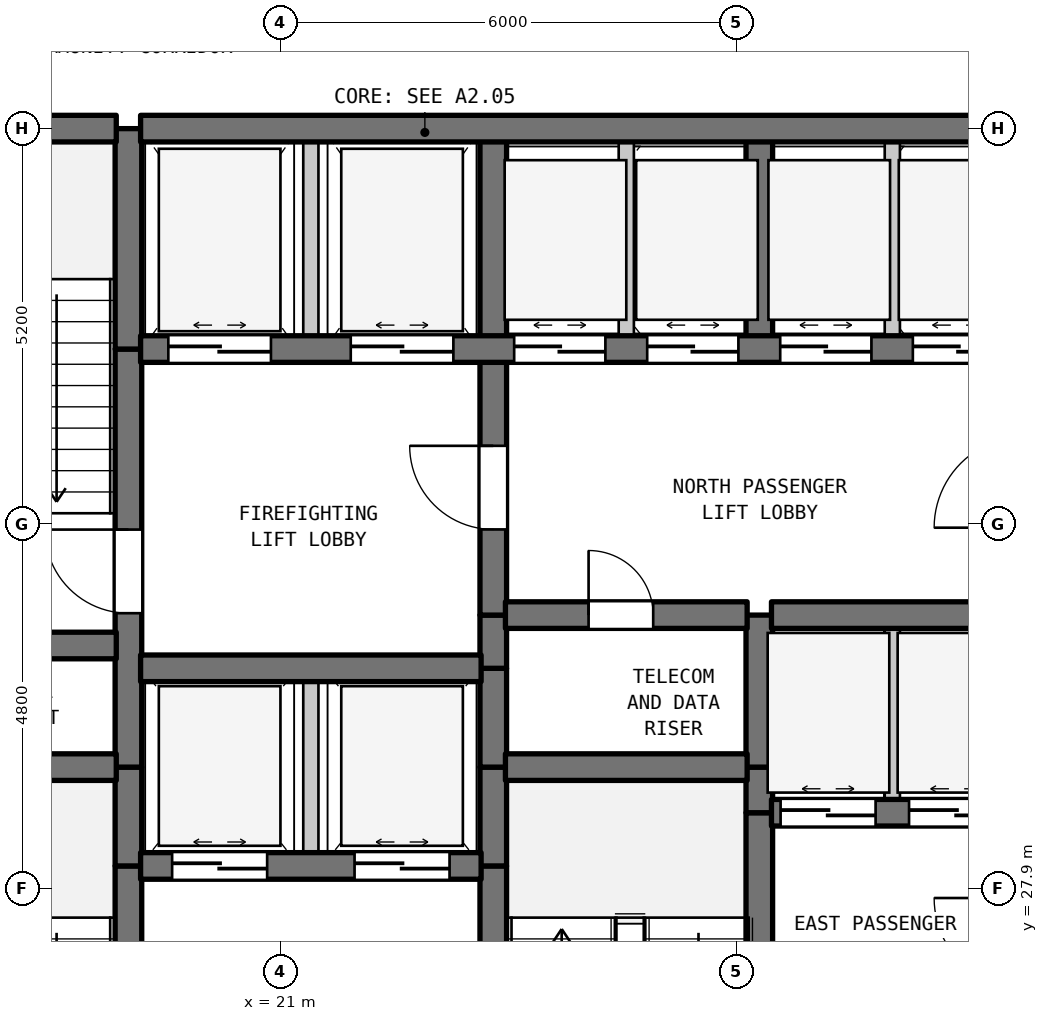
"""IFC4 building model, lengths in metres.
Left out: names, types, materials, properties, quantities, classifications, styles, units other than length and angle.
Written with IfcOpenShell. Run it as: python <this file> out.ifc"""

import sys

from ifc_helpers import new_model, si_unit, direction, frame, frame_2d, origin, place, context, subcontext, project, spatial, rectangle, extrude, element, fill, save


model = new_model("IFC4")
c1 = context("Model", 3, precision=1e-05, world=origin(), true_north=direction((0.0, 1.0)))
c2 = subcontext(c1, "Body", "Model", "MODEL_VIEW")
j1 = project(units=[si_unit("LENGTHUNIT", "METRE"), si_unit("PLANEANGLEUNIT", "RADIAN")], contexts=[c1])
p1 = place(None, origin())
s1 = spatial("IfcSite", under=j1, at=p1, CompositionType="ELEMENT")
p2 = place(p1, origin())
s2 = spatial("IfcBuilding", under=s1, at=p2, CompositionType="ELEMENT")
p3 = place(p2, frame((0.0, 0.0, 65.6)))
s3 = spatial("IfcBuildingStorey", under=s2, at=p3, CompositionType="ELEMENT", Elevation=65.6)
p4 = place(p3, frame((19.0, 22.7, 0.0), z_axis=(0.0, 0.0, 1.0), x_axis=(0.0, 1.0, 0.0)))
e1 = element("IfcWall", 1, at=p4, inside=s3, PredefinedType="SHEAR", context=c2, shape_type="SweptSolid", body=[
    extrude(rectangle(XDim=5.5, YDim=0.35, at=frame_2d((2.75, 0.0))), origin(), (0.0, 0.0, 1.0), 4.185),
])
p5 = place(p4, frame((0.631, 0.0, 0.0)))
e2 = element("IfcOpeningElement", 2, at=p5, cuts=e1, PredefinedType="OPENING", context=c2, shape_type="SweptSolid", body=[
    extrude(rectangle(XDim=1.1, YDim=2.15, at=frame_2d((0.55, 1.075))), frame((0.0, 0.185, 0.0), z_axis=(0.0, -1.0, 0.0), x_axis=(1.0, 0.0, 0.0)), (0.0, 0.0, 1.0), 0.37),
])
p6 = place(p3, frame((19.0, 28.2, 0.0), z_axis=(0.0, 0.0, 1.0), x_axis=(0.0, 1.0, 0.0)))
e3 = element("IfcWall", 3, at=p6, inside=s3, PredefinedType="SHEAR", context=c2, shape_type="SweptSolid", body=[
    extrude(rectangle(XDim=1.3, YDim=0.35, at=frame_2d((0.65, 0.0))), origin(), (0.0, 0.0, 1.0), 4.185),
])
p7 = place(p3, frame((19.0, 29.5, 0.0), z_axis=(0.0, 0.0, 1.0), x_axis=(0.0, 1.0, 0.0)))
e4 = element("IfcWall", 4, at=p7, inside=s3, PredefinedType="SHEAR", context=c2, shape_type="SweptSolid", body=[
    extrude(rectangle(XDim=5.5, YDim=0.35, at=frame_2d((2.75, 0.0))), origin(), (0.0, 0.0, 1.0), 4.185),
])
p8 = place(p7, frame((2.025, 0.0, 0.0)))
e5 = element("IfcOpeningElement", 5, at=p8, cuts=e4, PredefinedType="OPENING", context=c2, shape_type="SweptSolid", body=[
    extrude(rectangle(XDim=1.1, YDim=2.15, at=frame_2d((0.55, 1.075))), frame((0.0, 0.185, 0.0), z_axis=(0.0, -1.0, 0.0), x_axis=(1.0, 0.0, 0.0)), (0.0, 0.0, 1.0), 0.37),
])
p9 = place(p3, frame((19.0, 35.0, 0.0), z_axis=(0.0, 0.0, 1.0), x_axis=(0.0, 1.0, 0.0)))
e6 = element("IfcWall", 6, at=p9, inside=s3, PredefinedType="SHEAR", context=c2, shape_type="SweptSolid", body=[
    extrude(rectangle(XDim=2.9, YDim=0.35, at=frame_2d((1.45, 0.0))), origin(), (0.0, 0.0, 1.0), 4.185),
])
p10 = place(p3, frame((21.4, 28.2, 0.0), z_axis=(0.0, 0.0, 1.0), x_axis=(0.0, 1.0, 0.0)))
e7 = element("IfcWall", 7, at=p10, inside=s3, PredefinedType="STANDARD", context=c2, shape_type="SweptSolid", body=[
    extrude(rectangle(XDim=2.6, YDim=0.2, at=frame_2d((1.3, 0.0))), origin(), (0.0, 0.0, 1.0), 4.185),
])
p11 = place(p3, frame((21.4, 35.0, 0.0), z_axis=(0.0, 0.0, 1.0), x_axis=(0.0, 1.0, 0.0)))
e8 = element("IfcWall", 8, at=p11, inside=s3, PredefinedType="STANDARD", context=c2, shape_type="SweptSolid", body=[
    extrude(rectangle(XDim=2.9, YDim=0.2, at=frame_2d((1.45, 0.0))), origin(), (0.0, 0.0, 1.0), 4.185),
])
p12 = place(p3, frame((23.8, 22.7, 0.0), z_axis=(0.0, 0.0, 1.0), x_axis=(0.0, 1.0, 0.0)))
e9 = element("IfcWall", 9, at=p12, inside=s3, PredefinedType="SHEAR", context=c2, shape_type="SweptSolid", body=[
    extrude(rectangle(XDim=5.5, YDim=0.35, at=frame_2d((2.75, 0.0))), origin(), (0.0, 0.0, 1.0), 4.185),
])
p13 = place(p12, frame((0.235, 0.0, 0.0)))
e10 = element("IfcOpeningElement", 10, at=p13, cuts=e9, PredefinedType="OPENING", context=c2, shape_type="SweptSolid", body=[
    extrude(rectangle(XDim=1.1, YDim=2.15, at=frame_2d((0.55, 1.075))), frame((0.0, 0.185, 0.0), z_axis=(0.0, -1.0, 0.0), x_axis=(1.0, 0.0, 0.0)), (0.0, 0.0, 1.0), 0.37),
])
for number, where, z_axis, x_axis in (
    (11, (23.8, 28.2, 0.0), (0.0, 0.0, 1.0), (0.0, 1.0, 0.0)),
    (12, (23.8, 29.5, 0.0), (0.0, 0.0, 1.0), (0.0, 1.0, 0.0)),
):
    element("IfcWall", number, at=place(p3, frame(where, z_axis=z_axis, x_axis=x_axis)), inside=s3, PredefinedType="SHEAR", context=c2, shape_type="SweptSolid", body=[
        extrude(rectangle(XDim=1.3, YDim=0.35, at=frame_2d((0.65, 0.0))), origin(), (0.0, 0.0, 1.0), 4.185),
    ])
p14 = place(p3, frame((23.8, 30.8, 0.0), z_axis=(0.0, 0.0, 1.0), x_axis=(0.0, 1.0, 0.0)))
e13 = element("IfcWall", 13, at=p14, inside=s3, PredefinedType="SHEAR", context=c2, shape_type="SweptSolid", body=[
    extrude(rectangle(XDim=0.7, YDim=0.35, at=frame_2d((0.35, 0.0))), origin(), (0.0, 0.0, 1.0), 4.185),
])
p15 = place(p3, frame((23.8, 31.5, 0.0), z_axis=(0.0, 0.0, 1.0), x_axis=(0.0, 1.0, 0.0)))
e14 = element("IfcWall", 14, at=p15, inside=s3, PredefinedType="SHEAR", context=c2, shape_type="SweptSolid", body=[
    extrude(rectangle(XDim=3.5, YDim=0.35, at=frame_2d((1.75, 0.0))), origin(), (0.0, 0.0, 1.0), 4.185),
])
p16 = place(p15, frame((1.127, 0.0, 0.0)))
e15 = element("IfcOpeningElement", 15, at=p16, cuts=e14, PredefinedType="OPENING", context=c2, shape_type="SweptSolid", body=[
    extrude(rectangle(XDim=1.1, YDim=2.15, at=frame_2d((0.55, 1.075))), frame((0.0, 0.185, 0.0), z_axis=(0.0, -1.0, 0.0), x_axis=(1.0, 0.0, 0.0)), (0.0, 0.0, 1.0), 0.37),
])
p17 = place(p3, frame((23.8, 35.0, 0.0), z_axis=(0.0, 0.0, 1.0), x_axis=(0.0, 1.0, 0.0)))
e16 = element("IfcWall", 16, at=p17, inside=s3, PredefinedType="SHEAR", context=c2, shape_type="SweptSolid", body=[
    extrude(rectangle(XDim=2.9, YDim=0.35, at=frame_2d((1.45, 0.0))), origin(), (0.0, 0.0, 1.0), 4.185),
])
p18 = place(p3, frame((25.55, 35.0, 0.0), z_axis=(0.0, 0.0, 1.0), x_axis=(0.0, 1.0, 0.0)))
e17 = element("IfcWall", 17, at=p18, inside=s3, PredefinedType="STANDARD", context=c2, shape_type="SweptSolid", body=[
    extrude(rectangle(XDim=2.9, YDim=0.2, at=frame_2d((1.45, 0.0))), origin(), (0.0, 0.0, 1.0), 4.185),
])
p19 = place(p3, frame((27.3, 25.6, 0.0), z_axis=(0.0, 0.0, 1.0), x_axis=(0.0, 1.0, 0.0)))
e18 = element("IfcWall", 18, at=p19, inside=s3, PredefinedType="SHEAR", context=c2, shape_type="SweptSolid", body=[
    extrude(rectangle(XDim=3.3, YDim=0.35, at=frame_2d((1.65, 0.0))), origin(), (0.0, 0.0, 1.0), 4.185),
])
p20 = place(p3, frame((27.3, 28.9, 0.0), z_axis=(0.0, 0.0, 1.0), x_axis=(0.0, 1.0, 0.0)))
e19 = element("IfcWall", 19, at=p20, inside=s3, PredefinedType="SHEAR", context=c2, shape_type="SweptSolid", body=[
    extrude(rectangle(XDim=0.6, YDim=0.35, at=frame_2d((0.3, 0.0))), origin(), (0.0, 0.0, 1.0), 4.185),
])
p21 = place(p3, frame((27.3, 29.5, 0.0), z_axis=(0.0, 0.0, 1.0), x_axis=(0.0, 1.0, 0.0)))
e20 = element("IfcWall", 20, at=p21, inside=s3, PredefinedType="SHEAR", context=c2, shape_type="SweptSolid", body=[
    extrude(rectangle(XDim=2.0, YDim=0.35, at=frame_2d((1.0, 0.0))), origin(), (0.0, 0.0, 1.0), 4.185),
])
p22 = place(p3, frame((27.3, 35.0, 0.0), z_axis=(0.0, 0.0, 1.0), x_axis=(0.0, 1.0, 0.0)))
e21 = element("IfcWall", 21, at=p22, inside=s3, PredefinedType="SHEAR", context=c2, shape_type="SweptSolid", body=[
    extrude(rectangle(XDim=2.9, YDim=0.35, at=frame_2d((1.45, 0.0))), origin(), (0.0, 0.0, 1.0), 4.185),
])
p23 = place(p3, frame((29.05, 28.9, 0.0), z_axis=(0.0, 0.0, 1.0), x_axis=(0.0, 1.0, 0.0)))
e22 = element("IfcWall", 22, at=p23, inside=s3, PredefinedType="STANDARD", context=c2, shape_type="SweptSolid", body=[
    extrude(rectangle(XDim=2.6, YDim=0.2, at=frame_2d((1.3, 0.0))), origin(), (0.0, 0.0, 1.0), 4.185),
])
p24 = place(p3, frame((29.05, 35.0, 0.0), z_axis=(0.0, 0.0, 1.0), x_axis=(0.0, 1.0, 0.0)))
e23 = element("IfcWall", 23, at=p24, inside=s3, PredefinedType="STANDARD", context=c2, shape_type="SweptSolid", body=[
    extrude(rectangle(XDim=2.9, YDim=0.2, at=frame_2d((1.45, 0.0))), origin(), (0.0, 0.0, 1.0), 4.185),
])
p25 = place(p3, frame((19.16, 28.2, 0.0), z_axis=(0.0, 0.0, 1.0), x_axis=(1.0, 0.0, 0.0)))
e24 = element("IfcWall", 24, at=p25, inside=s3, PredefinedType="SHEAR", context=c2, shape_type="SweptSolid", body=[
    extrude(rectangle(XDim=4.48, YDim=0.35, at=frame_2d((2.24, 0.0))), origin(), (0.0, 0.0, 1.0), 4.185),
])
p26 = place(p25, frame((0.415, 0.0, 0.0)))
e25 = element("IfcOpeningElement", 25, at=p26, cuts=e24, PredefinedType="OPENING", context=c2, shape_type="SweptSolid", body=[
    extrude(rectangle(XDim=1.25, YDim=2.2, at=frame_2d((0.625, 1.1))), frame((0.0, 0.185, 0.0), z_axis=(0.0, -1.0, 0.0), x_axis=(1.0, 0.0, 0.0)), (0.0, 0.0, 1.0), 0.37),
])
p27 = place(p25, frame((2.815, 0.0, 0.0)))
e26 = element("IfcOpeningElement", 26, at=p27, cuts=e24, PredefinedType="OPENING", context=c2, shape_type="SweptSolid", body=[
    extrude(rectangle(XDim=1.25, YDim=2.2, at=frame_2d((0.625, 1.1))), frame((0.0, 0.185, 0.0), z_axis=(0.0, -1.0, 0.0), x_axis=(1.0, 0.0, 0.0)), (0.0, 0.0, 1.0), 0.37),
])
p28 = place(p3, frame((27.46, 28.9, 0.0), z_axis=(0.0, 0.0, 1.0), x_axis=(1.0, 0.0, 0.0)))
e27 = element("IfcWall", 27, at=p28, inside=s3, PredefinedType="SHEAR", context=c2, shape_type="SweptSolid", body=[
    extrude(rectangle(XDim=3.18, YDim=0.35, at=frame_2d((1.59, 0.0))), origin(), (0.0, 0.0, 1.0), 4.185),
])
p29 = place(p28, frame((0.12, 0.0, 0.0)))
e28 = element("IfcOpeningElement", 28, at=p29, cuts=e27, PredefinedType="OPENING", context=c2, shape_type="SweptSolid", body=[
    extrude(rectangle(XDim=1.25, YDim=2.2, at=frame_2d((0.625, 1.1))), frame((0.0, 0.185, 0.0), z_axis=(0.0, -1.0, 0.0), x_axis=(1.0, 0.0, 0.0)), (0.0, 0.0, 1.0), 0.37),
])
p30 = place(p28, frame((1.81, 0.0, 0.0)))
e29 = element("IfcOpeningElement", 29, at=p30, cuts=e27, PredefinedType="OPENING", context=c2, shape_type="SweptSolid", body=[
    extrude(rectangle(XDim=1.25, YDim=2.2, at=frame_2d((0.625, 1.1))), frame((0.0, 0.185, 0.0), z_axis=(0.0, -1.0, 0.0), x_axis=(1.0, 0.0, 0.0)), (0.0, 0.0, 1.0), 0.37),
])
p31 = place(p3, frame((15.16, 29.5, 0.0), z_axis=(0.0, 0.0, 1.0), x_axis=(1.0, 0.0, 0.0)))
e30 = element("IfcWall", 30, at=p31, inside=s3, PredefinedType="SHEAR", context=c2, shape_type="SweptSolid", body=[
    extrude(rectangle(XDim=3.68, YDim=0.35, at=frame_2d((1.84, 0.0))), origin(), (0.0, 0.0, 1.0), 4.185),
])
p32 = place(p3, frame((23.96, 29.5, 0.0), z_axis=(0.0, 0.0, 1.0), x_axis=(1.0, 0.0, 0.0)))
e31 = element("IfcWall", 31, at=p32, inside=s3, PredefinedType="SHEAR", context=c2, shape_type="SweptSolid", body=[
    extrude(rectangle(XDim=3.18, YDim=0.35, at=frame_2d((1.59, 0.0))), origin(), (0.0, 0.0, 1.0), 4.185),
])
p33 = place(p3, frame((19.16, 30.8, 0.0), z_axis=(0.0, 0.0, 1.0), x_axis=(1.0, 0.0, 0.0)))
e32 = element("IfcWall", 32, at=p33, inside=s3, PredefinedType="SHEAR", context=c2, shape_type="SweptSolid", body=[
    extrude(rectangle(XDim=4.48, YDim=0.35, at=frame_2d((2.24, 0.0))), origin(), (0.0, 0.0, 1.0), 4.185),
])
p34 = place(p3, frame((15.16, 31.1, 0.0), z_axis=(0.0, 0.0, 1.0), x_axis=(1.0, 0.0, 0.0)))
e33 = element("IfcWall", 33, at=p34, inside=s3, PredefinedType="SHEAR", context=c2, shape_type="SweptSolid", body=[
    extrude(rectangle(XDim=3.68, YDim=0.35, at=frame_2d((1.84, 0.0))), origin(), (0.0, 0.0, 1.0), 4.185),
])
p35 = place(p3, frame((23.96, 31.5, 0.0), z_axis=(0.0, 0.0, 1.0), x_axis=(1.0, 0.0, 0.0)))
e34 = element("IfcWall", 34, at=p35, inside=s3, PredefinedType="SHEAR", context=c2, shape_type="SweptSolid", body=[
    extrude(rectangle(XDim=3.18, YDim=0.35, at=frame_2d((1.59, 0.0))), origin(), (0.0, 0.0, 1.0), 4.185),
])
p36 = place(p35, frame((1.094, 0.0, 0.0)))
e35 = element("IfcOpeningElement", 35, at=p36, cuts=e34, PredefinedType="OPENING", context=c2, shape_type="SweptSolid", body=[
    extrude(rectangle(XDim=0.85, YDim=2.1, at=frame_2d((0.425, 1.05))), frame((0.0, 0.185, 0.0), z_axis=(0.0, -1.0, 0.0), x_axis=(1.0, 0.0, 0.0)), (0.0, 0.0, 1.0), 0.37),
])
p37 = place(p3, frame((27.46, 31.5, 0.0), z_axis=(0.0, 0.0, 1.0), x_axis=(1.0, 0.0, 0.0)))
e36 = element("IfcWall", 36, at=p37, inside=s3, PredefinedType="SHEAR", context=c2, shape_type="SweptSolid", body=[
    extrude(rectangle(XDim=3.18, YDim=0.35, at=frame_2d((1.59, 0.0))), origin(), (0.0, 0.0, 1.0), 4.185),
])
p38 = place(p3, frame((19.16, 35.0, 0.0), z_axis=(0.0, 0.0, 1.0), x_axis=(1.0, 0.0, 0.0)))
e37 = element("IfcWall", 37, at=p38, inside=s3, PredefinedType="SHEAR", context=c2, shape_type="SweptSolid", body=[
    extrude(rectangle(XDim=11.48, YDim=0.35, at=frame_2d((5.74, 0.0))), origin(), (0.0, 0.0, 1.0), 4.185),
])
p39 = place(p38, frame((0.365, 0.0, 0.0)))
e38 = element("IfcOpeningElement", 38, at=p39, cuts=e37, PredefinedType="OPENING", context=c2, shape_type="SweptSolid", body=[
    extrude(rectangle(XDim=1.35, YDim=2.2, at=frame_2d((0.675, 1.1))), frame((0.0, 0.185, 0.0), z_axis=(0.0, -1.0, 0.0), x_axis=(1.0, 0.0, 0.0)), (0.0, 0.0, 1.0), 0.37),
])
p40 = place(p38, frame((2.765, 0.0, 0.0)))
e39 = element("IfcOpeningElement", 39, at=p40, cuts=e37, PredefinedType="OPENING", context=c2, shape_type="SweptSolid", body=[
    extrude(rectangle(XDim=1.35, YDim=2.2, at=frame_2d((0.675, 1.1))), frame((0.0, 0.185, 0.0), z_axis=(0.0, -1.0, 0.0), x_axis=(1.0, 0.0, 0.0)), (0.0, 0.0, 1.0), 0.37),
])
p41 = place(p38, frame((4.915, 0.0, 0.0)))
e40 = element("IfcOpeningElement", 40, at=p41, cuts=e37, PredefinedType="OPENING", context=c2, shape_type="SweptSolid", body=[
    extrude(rectangle(XDim=1.2, YDim=2.2, at=frame_2d((0.6, 1.1))), frame((0.0, 0.185, 0.0), z_axis=(0.0, -1.0, 0.0), x_axis=(1.0, 0.0, 0.0)), (0.0, 0.0, 1.0), 0.37),
])
p42 = place(p38, frame((6.665, 0.0, 0.0)))
e41 = element("IfcOpeningElement", 41, at=p42, cuts=e37, PredefinedType="OPENING", context=c2, shape_type="SweptSolid", body=[
    extrude(rectangle(XDim=1.2, YDim=2.2, at=frame_2d((0.6, 1.1))), frame((0.0, 0.185, 0.0), z_axis=(0.0, -1.0, 0.0), x_axis=(1.0, 0.0, 0.0)), (0.0, 0.0, 1.0), 0.37),
])
p43 = place(p38, frame((8.415, 0.0, 0.0)))
e42 = element("IfcOpeningElement", 42, at=p43, cuts=e37, PredefinedType="OPENING", context=c2, shape_type="SweptSolid", body=[
    extrude(rectangle(XDim=1.2, YDim=2.2, at=frame_2d((0.6, 1.1))), frame((0.0, 0.185, 0.0), z_axis=(0.0, -1.0, 0.0), x_axis=(1.0, 0.0, 0.0)), (0.0, 0.0, 1.0), 0.37),
])
p44 = place(p38, frame((10.16, 0.0, 0.0)))
e43 = element("IfcOpeningElement", 43, at=p44, cuts=e37, PredefinedType="OPENING", context=c2, shape_type="SweptSolid", body=[
    extrude(rectangle(XDim=1.2, YDim=2.2, at=frame_2d((0.6, 1.1))), frame((0.0, 0.185, 0.0), z_axis=(0.0, -1.0, 0.0), x_axis=(1.0, 0.0, 0.0)), (0.0, 0.0, 1.0), 0.37),
])
p45 = place(p3, frame((15.16, 37.9, 0.0), z_axis=(0.0, 0.0, 1.0), x_axis=(1.0, 0.0, 0.0)))
e44 = element("IfcWall", 44, at=p45, inside=s3, PredefinedType="SHEAR", context=c2, shape_type="SweptSolid", body=[
    extrude(rectangle(XDim=3.68, YDim=0.35, at=frame_2d((1.84, 0.0))), origin(), (0.0, 0.0, 1.0), 4.185),
])
p46 = place(p3, frame((19.16, 37.9, 0.0), z_axis=(0.0, 0.0, 1.0), x_axis=(1.0, 0.0, 0.0)))
e45 = element("IfcWall", 45, at=p46, inside=s3, PredefinedType="SHEAR", context=c2, shape_type="SweptSolid", body=[
    extrude(rectangle(XDim=11.48, YDim=0.35, at=frame_2d((5.74, 0.0))), origin(), (0.0, 0.0, 1.0), 4.185),
])
p47 = place(p8, origin())
e46 = element("IfcDoor", 46, at=p47, inside=s3, OperationType="SINGLE_SWING_RIGHT", PredefinedType="DOOR", context=c2, shape_type="SweptSolid", body=[
    extrude(rectangle(XDim=1.1, YDim=2.15, at=frame_2d((0.55, 1.075))), frame((0.0, 0.025, 0.0), z_axis=(0.0, -1.0, 0.0), x_axis=(1.0, 0.0, 0.0)), (0.0, 0.0, 1.0), 0.05),
])
fill(e5, e46)
p48 = place(p16, origin())
e47 = element("IfcDoor", 47, at=p48, inside=s3, OperationType="SINGLE_SWING_RIGHT", PredefinedType="DOOR", context=c2, shape_type="SweptSolid", body=[
    extrude(rectangle(XDim=1.1, YDim=2.15, at=frame_2d((0.55, 1.075))), frame((0.0, 0.025, 0.0), z_axis=(0.0, -1.0, 0.0), x_axis=(1.0, 0.0, 0.0)), (0.0, 0.0, 1.0), 0.05),
])
fill(e15, e47)
p49 = place(p26, origin())
e48 = element("IfcDoor", 48, at=p49, inside=s3, OperationType="DOUBLE_DOOR_SLIDING", PredefinedType="DOOR", context=c2, shape_type="SweptSolid", body=[
    extrude(rectangle(XDim=1.25, YDim=2.2, at=frame_2d((0.625, 1.1))), frame((0.0, 0.025, 0.0), z_axis=(0.0, -1.0, 0.0), x_axis=(1.0, 0.0, 0.0)), (0.0, 0.0, 1.0), 0.05),
])
fill(e25, e48)
p50 = place(p27, origin())
e49 = element("IfcDoor", 49, at=p50, inside=s3, OperationType="DOUBLE_DOOR_SLIDING", PredefinedType="DOOR", context=c2, shape_type="SweptSolid", body=[
    extrude(rectangle(XDim=1.25, YDim=2.2, at=frame_2d((0.625, 1.1))), frame((0.0, 0.025, 0.0), z_axis=(0.0, -1.0, 0.0), x_axis=(1.0, 0.0, 0.0)), (0.0, 0.0, 1.0), 0.05),
])
fill(e26, e49)
p51 = place(p29, origin())
e50 = element("IfcDoor", 50, at=p51, inside=s3, OperationType="DOUBLE_DOOR_SLIDING", PredefinedType="DOOR", context=c2, shape_type="SweptSolid", body=[
    extrude(rectangle(XDim=1.25, YDim=2.2, at=frame_2d((0.625, 1.1))), frame((0.0, 0.025, 0.0), z_axis=(0.0, -1.0, 0.0), x_axis=(1.0, 0.0, 0.0)), (0.0, 0.0, 1.0), 0.05),
])
fill(e28, e50)
p52 = place(p30, origin())
e51 = element("IfcDoor", 51, at=p52, inside=s3, OperationType="DOUBLE_DOOR_SLIDING", PredefinedType="DOOR", context=c2, shape_type="SweptSolid", body=[
    extrude(rectangle(XDim=1.25, YDim=2.2, at=frame_2d((0.625, 1.1))), frame((0.0, 0.025, 0.0), z_axis=(0.0, -1.0, 0.0), x_axis=(1.0, 0.0, 0.0)), (0.0, 0.0, 1.0), 0.05),
])
fill(e29, e51)
p53 = place(p36, origin())
e52 = element("IfcDoor", 52, at=p53, inside=s3, OperationType="SINGLE_SWING_LEFT", PredefinedType="DOOR", context=c2, shape_type="SweptSolid", body=[
    extrude(rectangle(XDim=0.85, YDim=2.1, at=frame_2d((0.425, 1.05))), frame((0.0, 0.025, 0.0), z_axis=(0.0, -1.0, 0.0), x_axis=(1.0, 0.0, 0.0)), (0.0, 0.0, 1.0), 0.05),
])
fill(e35, e52)
p54 = place(p39, origin())
e53 = element("IfcDoor", 53, at=p54, inside=s3, OperationType="DOUBLE_DOOR_SLIDING", PredefinedType="DOOR", context=c2, shape_type="SweptSolid", body=[
    extrude(rectangle(XDim=1.35, YDim=2.2, at=frame_2d((0.675, 1.1))), frame((0.0, 0.025, 0.0), z_axis=(0.0, -1.0, 0.0), x_axis=(1.0, 0.0, 0.0)), (0.0, 0.0, 1.0), 0.05),
])
fill(e38, e53)
p55 = place(p40, origin())
e54 = element("IfcDoor", 54, at=p55, inside=s3, OperationType="DOUBLE_DOOR_SLIDING", PredefinedType="DOOR", context=c2, shape_type="SweptSolid", body=[
    extrude(rectangle(XDim=1.35, YDim=2.2, at=frame_2d((0.675, 1.1))), frame((0.0, 0.025, 0.0), z_axis=(0.0, -1.0, 0.0), x_axis=(1.0, 0.0, 0.0)), (0.0, 0.0, 1.0), 0.05),
])
fill(e39, e54)
p56 = place(p41, origin())
e55 = element("IfcDoor", 55, at=p56, inside=s3, OperationType="DOUBLE_DOOR_SLIDING", PredefinedType="DOOR", context=c2, shape_type="SweptSolid", body=[
    extrude(rectangle(XDim=1.2, YDim=2.2, at=frame_2d((0.6, 1.1))), frame((0.0, 0.025, 0.0), z_axis=(0.0, -1.0, 0.0), x_axis=(1.0, 0.0, 0.0)), (0.0, 0.0, 1.0), 0.05),
])
fill(e40, e55)
p57 = place(p42, origin())
e56 = element("IfcDoor", 56, at=p57, inside=s3, OperationType="DOUBLE_DOOR_SLIDING", PredefinedType="DOOR", context=c2, shape_type="SweptSolid", body=[
    extrude(rectangle(XDim=1.2, YDim=2.2, at=frame_2d((0.6, 1.1))), frame((0.0, 0.025, 0.0), z_axis=(0.0, -1.0, 0.0), x_axis=(1.0, 0.0, 0.0)), (0.0, 0.0, 1.0), 0.05),
])
fill(e41, e56)
p58 = place(p43, origin())
e57 = element("IfcDoor", 57, at=p58, inside=s3, OperationType="DOUBLE_DOOR_SLIDING", PredefinedType="DOOR", context=c2, shape_type="SweptSolid", body=[
    extrude(rectangle(XDim=1.2, YDim=2.2, at=frame_2d((0.6, 1.1))), frame((0.0, 0.025, 0.0), z_axis=(0.0, -1.0, 0.0), x_axis=(1.0, 0.0, 0.0)), (0.0, 0.0, 1.0), 0.05),
])
fill(e42, e57)
p59 = place(p44, origin())
e58 = element("IfcDoor", 58, at=p59, inside=s3, OperationType="DOUBLE_DOOR_SLIDING", PredefinedType="DOOR", context=c2, shape_type="SweptSolid", body=[
    extrude(rectangle(XDim=1.2, YDim=2.2, at=frame_2d((0.6, 1.1))), frame((0.0, 0.025, 0.0), z_axis=(0.0, -1.0, 0.0), x_axis=(1.0, 0.0, 0.0)), (0.0, 0.0, 1.0), 0.05),
])
fill(e43, e58)
save(model, sys.argv[1])
